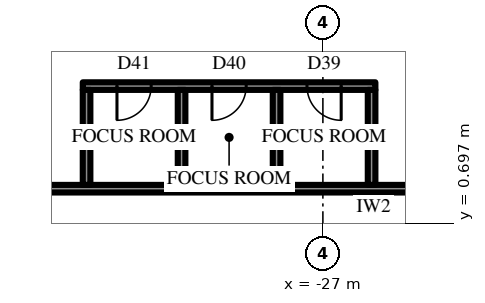
"""IFC4 building model, lengths in metres.
Left out: names, types, materials, properties, quantities, classifications, styles, units other than length and angle.
Written with IfcOpenShell. Run it as: python <this file> out.ifc"""

import sys

from ifc_helpers import new_model, si_unit, direction, frame, frame_2d, origin, place, context, subcontext, project, spatial, rectangle, extrude, element, fill, save


model = new_model("IFC4")
c1 = context("Model", 3, precision=1e-05, world=origin(), true_north=direction((0.0, 1.0)))
c2 = subcontext(c1, "Body", "Model", "MODEL_VIEW")
j1 = project(units=[si_unit("LENGTHUNIT", "METRE"), si_unit("PLANEANGLEUNIT", "RADIAN")], contexts=[c1])
p1 = place(None, origin())
s1 = spatial("IfcSite", under=j1, at=p1, CompositionType="ELEMENT")
p2 = place(p1, origin())
s2 = spatial("IfcBuilding", under=s1, at=p2, CompositionType="ELEMENT")
p3 = place(p2, frame((0.0, 0.0, 52.9)))
s3 = spatial("IfcBuildingStorey", under=s2, at=p3, CompositionType="ELEMENT", Elevation=52.9)
p4 = place(p3, frame((-21.1, 1.6, 0.0), z_axis=(0.0, 0.0, 1.0), x_axis=(-1.0, 0.0, 0.0)))
e1 = element("IfcWall", 1, at=p4, inside=s3, PredefinedType="PARTITIONING", context=c2, shape_type="SweptSolid", body=[
    extrude(rectangle(XDim=15.215, YDim=0.2, at=frame_2d((7.608, 0.0))), origin(), (0.0, 0.0, 1.0), 4.0),
])
p5 = place(p4, frame((1.021, 0.0, 0.0)))
e2 = element("IfcOpeningElement", 2, at=p5, cuts=e1, PredefinedType="OPENING", context=c2, shape_type="SweptSolid", body=[
    extrude(rectangle(XDim=1.0, YDim=2.2, at=frame_2d((0.5, 1.1))), frame((0.0, 0.11, 0.0), z_axis=(0.0, -1.0, 0.0), x_axis=(1.0, 0.0, 0.0)), (0.0, 0.0, 1.0), 0.22),
])
p6 = place(p3, frame((-25.618, 4.3, 0.0), z_axis=(0.0, 0.0, 1.0), x_axis=(-1.0, 0.0, 0.0)))
e3 = element("IfcWall", 3, at=p6, inside=s3, PredefinedType="PARTITIONING", context=c2, shape_type="SweptSolid", body=[
    extrude(rectangle(XDim=7.7, YDim=0.2, at=frame_2d((3.85, 0.0))), origin(), (0.0, 0.0, 1.0), 4.0),
])
p7 = place(p6, frame((0.9, 0.0, 0.0)))
e4 = element("IfcOpeningElement", 4, at=p7, cuts=e3, PredefinedType="OPENING", context=c2, shape_type="SweptSolid", body=[
    extrude(rectangle(XDim=0.9, YDim=2.2, at=frame_2d((0.45, 1.1))), frame((0.0, 0.11, 0.0), z_axis=(0.0, -1.0, 0.0), x_axis=(1.0, 0.0, 0.0)), (0.0, 0.0, 1.0), 0.22),
])
p8 = place(p6, frame((3.4, 0.0, 0.0)))
e5 = element("IfcOpeningElement", 5, at=p8, cuts=e3, PredefinedType="OPENING", context=c2, shape_type="SweptSolid", body=[
    extrude(rectangle(XDim=0.9, YDim=2.2, at=frame_2d((0.45, 1.1))), frame((0.0, 0.11, 0.0), z_axis=(0.0, -1.0, 0.0), x_axis=(1.0, 0.0, 0.0)), (0.0, 0.0, 1.0), 0.22),
])
p9 = place(p6, frame((5.9, 0.0, 0.0)))
e6 = element("IfcOpeningElement", 6, at=p9, cuts=e3, PredefinedType="OPENING", context=c2, shape_type="SweptSolid", body=[
    extrude(rectangle(XDim=0.9, YDim=2.2, at=frame_2d((0.45, 1.1))), frame((0.0, 0.11, 0.0), z_axis=(0.0, -1.0, 0.0), x_axis=(1.0, 0.0, 0.0)), (0.0, 0.0, 1.0), 0.22),
])
for number, where, z_axis, x_axis in (
    (7, (-25.719, 1.7, 0.0), (0.0, 0.0, 1.0), (0.0, 1.0, 0.0)),
    (8, (-28.219, 1.7, 0.0), (0.0, 0.0, 1.0), (0.0, 1.0, 0.0)),
    (9, (-30.719, 1.7, 0.0), (0.0, 0.0, 1.0), (0.0, 1.0, 0.0)),
    (10, (-33.219, 1.7, 0.0), (0.0, 0.0, 1.0), (0.0, 1.0, 0.0)),
):
    element("IfcWall", number, at=place(p3, frame(where, z_axis=z_axis, x_axis=x_axis)), inside=s3, PredefinedType="PARTITIONING", context=c2, shape_type="SweptSolid", body=[
        extrude(rectangle(XDim=2.5, YDim=0.2, at=frame_2d((1.25, 0.0))), origin(), (0.0, 0.0, 1.0), 4.0),
    ])
p10 = place(p7, origin())
e11 = element("IfcDoor", 11, at=p10, inside=s3, OperationType="SINGLE_SWING_RIGHT", PredefinedType="DOOR", context=c2, shape_type="SweptSolid", body=[
    extrude(rectangle(XDim=0.9, YDim=2.2, at=frame_2d((0.45, 1.1))), frame((0.0, 0.025, 0.0), z_axis=(0.0, -1.0, 0.0), x_axis=(1.0, 0.0, 0.0)), (0.0, 0.0, 1.0), 0.05),
])
fill(e4, e11)
p11 = place(p8, origin())
e12 = element("IfcDoor", 12, at=p11, inside=s3, OperationType="SINGLE_SWING_LEFT", PredefinedType="DOOR", context=c2, shape_type="SweptSolid", body=[
    extrude(rectangle(XDim=0.9, YDim=2.2, at=frame_2d((0.45, 1.1))), frame((0.0, 0.025, 0.0), z_axis=(0.0, -1.0, 0.0), x_axis=(1.0, 0.0, 0.0)), (0.0, 0.0, 1.0), 0.05),
])
fill(e5, e12)
p12 = place(p9, origin())
e13 = element("IfcDoor", 13, at=p12, inside=s3, OperationType="SINGLE_SWING_LEFT", PredefinedType="DOOR", context=c2, shape_type="SweptSolid", body=[
    extrude(rectangle(XDim=0.9, YDim=2.2, at=frame_2d((0.45, 1.1))), frame((0.0, 0.025, 0.0), z_axis=(0.0, -1.0, 0.0), x_axis=(1.0, 0.0, 0.0)), (0.0, 0.0, 1.0), 0.05),
])
fill(e6, e13)
save(model, sys.argv[1])
